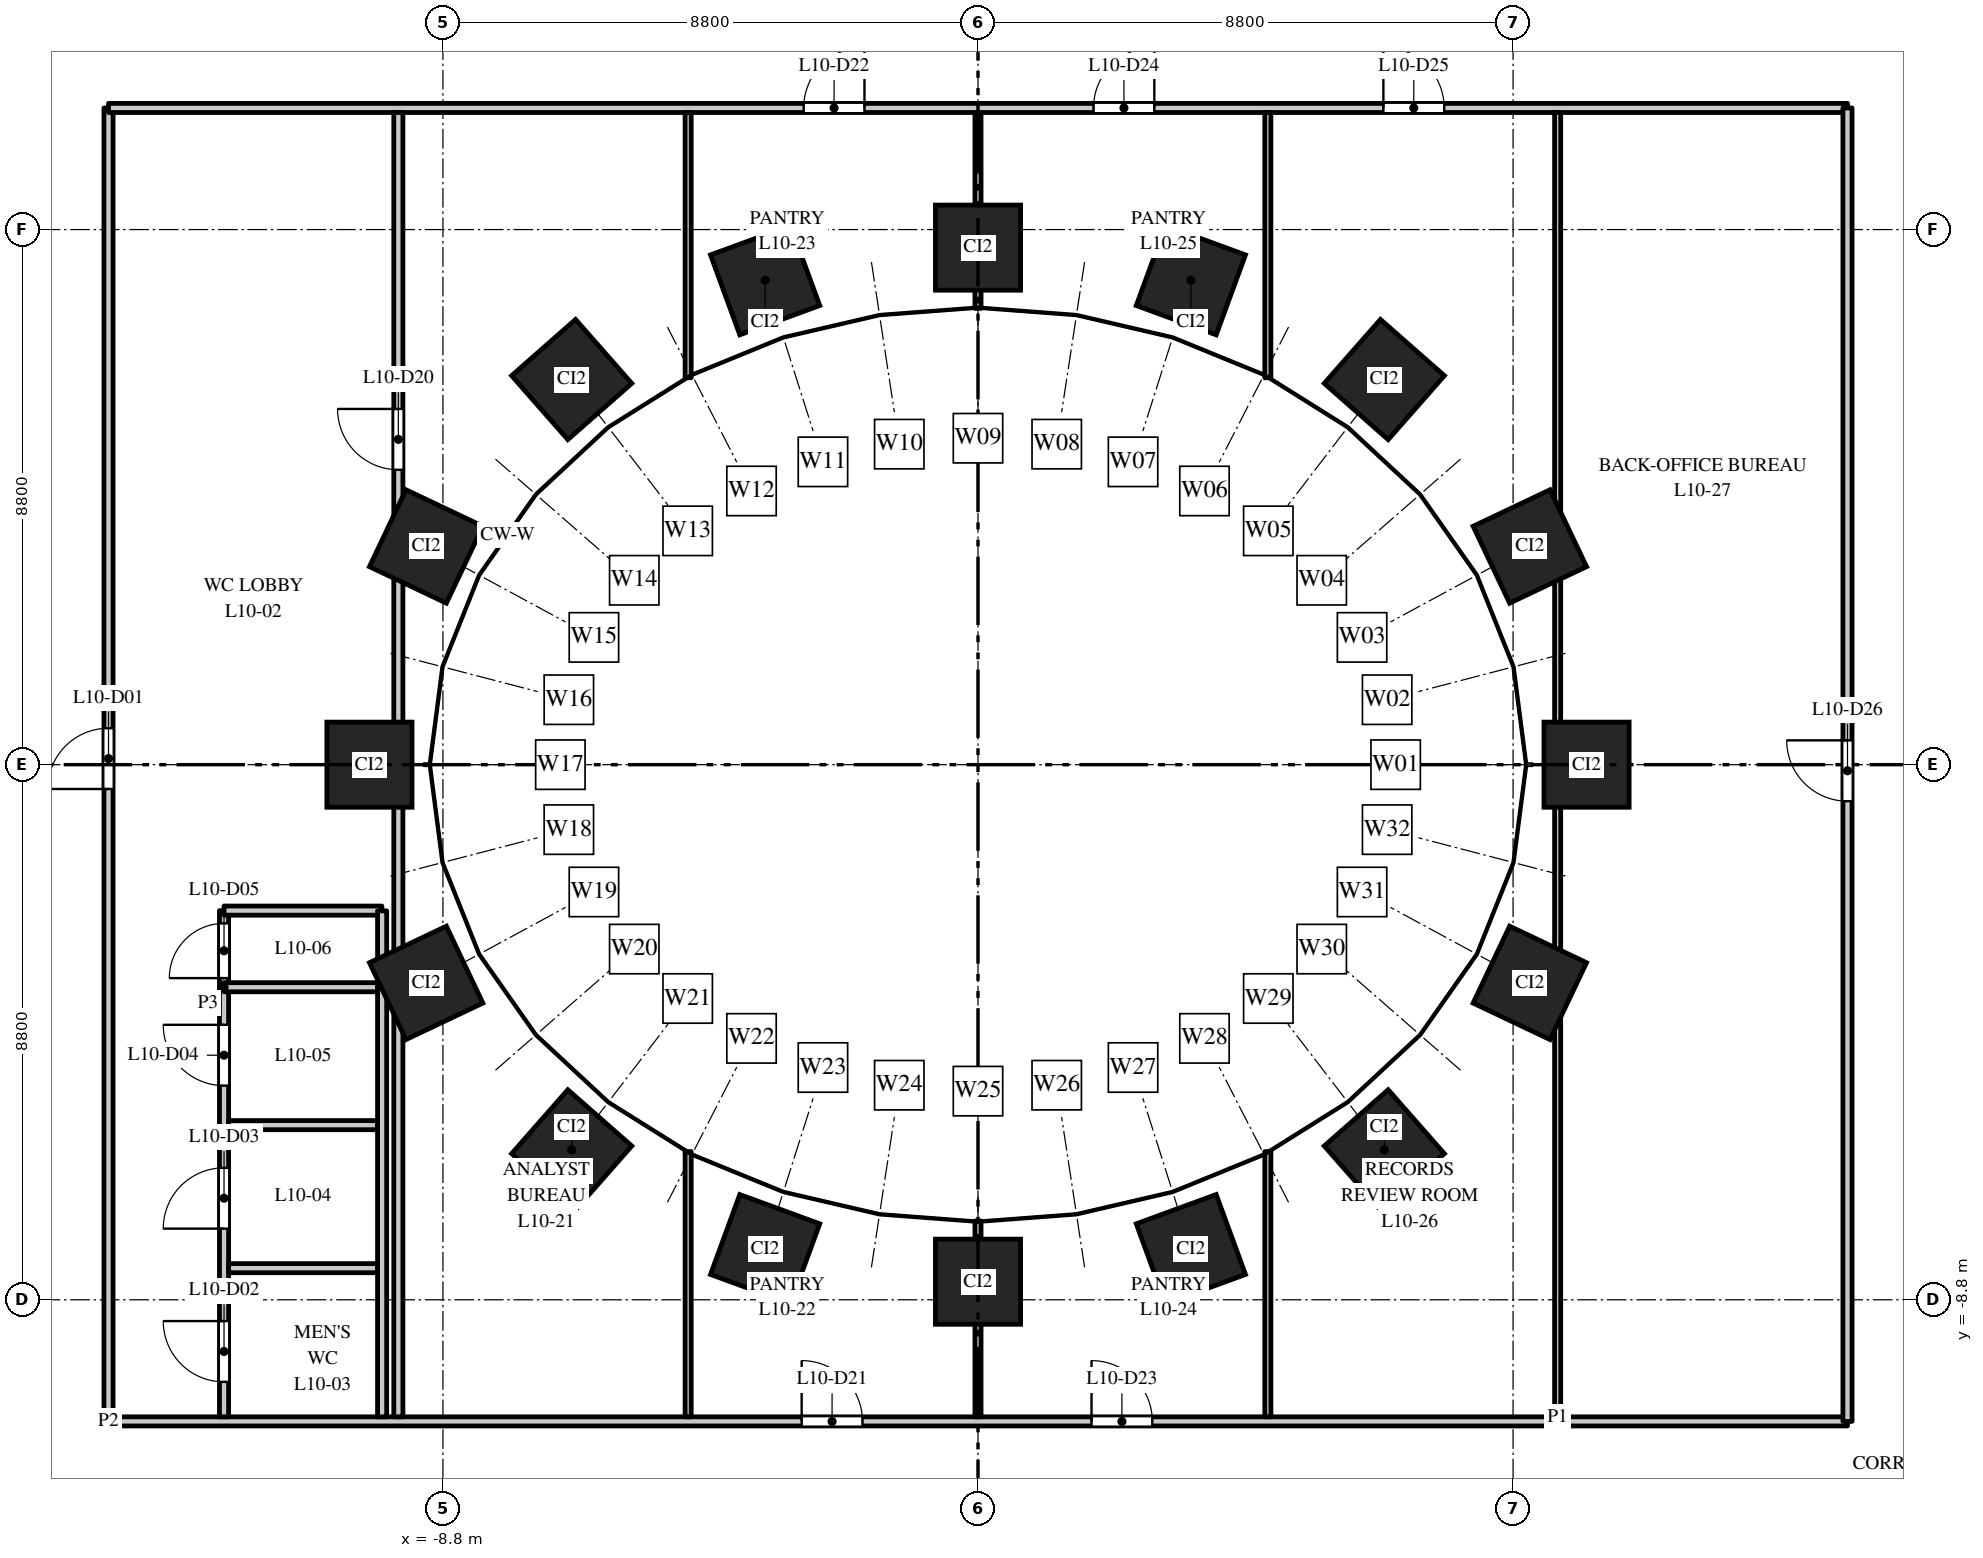
"""IFC4 building model, lengths in metres.
Left out: names, types, materials, properties, quantities, classifications, styles, units other than length and angle.
Written with IfcOpenShell. Run it as: python <this file> out.ifc"""

import sys

from ifc_helpers import new_model, si_unit, direction, frame, frame_2d, origin, origin_2d, place, context, subcontext, project, spatial, rectangle, extrude, element, fill, save


model = new_model("IFC4")
c1 = context("Model", 3, precision=1e-05, world=origin(), true_north=direction((0.0, 1.0)))
c2 = subcontext(c1, "Body", "Model", "MODEL_VIEW")
j1 = project(units=[si_unit("LENGTHUNIT", "METRE"), si_unit("PLANEANGLEUNIT", "RADIAN")], contexts=[c1])
p1 = place(None, origin())
s1 = spatial("IfcSite", under=j1, at=p1, CompositionType="ELEMENT")
p2 = place(p1, origin())
s2 = spatial("IfcBuilding", under=s1, at=p2, CompositionType="ELEMENT")
p3 = place(p2, frame((0.0, 0.0, 50.5)))
s3 = spatial("IfcBuildingStorey", under=s2, at=p3, CompositionType="ELEMENT", Elevation=50.5)
for number, where, z_axis, x_axis in (
    (1, (10.008, 0.0, 0.0), (0.0, 0.0, 1.0), (0.0, 1.0, 0.0)),
    (2, (9.076, 3.588, 0.0), (0.0, 0.0, 1.0), (-0.429, 0.903, 0.0)),
    (3, (6.682, 6.334, 0.0), (0.0, 0.0, 1.0), (-0.751, 0.66, 0.0)),
    (4, (3.501, 7.967, 0.0), (0.0, 0.0, 1.0), (-0.939, 0.344, 0.0)),
    (5, (0.0, 8.503, 0.0), (0.0, 0.0, 1.0), (-1.0, 0.0, 0.0)),
    (6, (-3.501, 7.967, 0.0), (0.0, 0.0, 1.0), (-0.939, -0.344, 0.0)),
    (7, (-6.682, 6.334, 0.0), (0.0, 0.0, 1.0), (-0.751, -0.66, 0.0)),
    (8, (-9.076, 3.588, 0.0), (0.0, 0.0, 1.0), (-0.429, -0.903, 0.0)),
    (9, (-10.008, 0.0, 0.0), (0.0, 0.0, 1.0), (0.0, -1.0, 0.0)),
    (10, (-9.076, -3.588, 0.0), (0.0, 0.0, 1.0), (0.429, -0.903, 0.0)),
    (11, (-6.682, -6.334, 0.0), (0.0, 0.0, 1.0), (0.751, -0.66, 0.0)),
    (12, (-3.501, -7.967, 0.0), (0.0, 0.0, 1.0), (0.939, -0.344, 0.0)),
    (13, (0.0, -8.503, 0.0), (0.0, 0.0, 1.0), (1.0, 0.0, 0.0)),
    (14, (3.501, -7.967, 0.0), (0.0, 0.0, 1.0), (0.939, 0.344, 0.0)),
    (15, (6.682, -6.334, 0.0), (0.0, 0.0, 1.0), (0.751, 0.66, 0.0)),
    (16, (9.076, -3.588, 0.0), (0.0, 0.0, 1.0), (0.429, 0.903, 0.0)),
):
    element("IfcColumn", number, at=place(p3, frame(where, z_axis=z_axis, x_axis=x_axis)), inside=s3, PredefinedType="COLUMN", context=c2, shape_type="SweptSolid", body=[
        extrude(rectangle(XDim=1.4, YDim=1.4, at=origin_2d()), origin(), (0.0, 0.0, 1.0), 4.0),
    ])
p4 = place(p3, frame((-14.3, -10.8, 0.0), z_axis=(0.0, 0.0, 1.0), x_axis=(0.0, 1.0, 0.0)))
e17 = element("IfcWall", 17, at=p4, inside=s3, PredefinedType="PARTITIONING", context=c2, shape_type="SweptSolid", body=[
    extrude(rectangle(XDim=21.6, YDim=0.15, at=frame_2d((10.8, 0.0))), origin(), (0.0, 0.0, 1.0), 2.75),
])
p5 = place(p4, frame((10.4, 0.0, 0.0)))
e18 = element("IfcOpeningElement", 18, at=p5, cuts=e17, PredefinedType="OPENING", context=c2, shape_type="SweptSolid", body=[
    extrude(rectangle(XDim=1.0, YDim=2.1, at=frame_2d((0.5, 1.05))), frame((0.0, 0.085, 0.0), z_axis=(0.0, -1.0, 0.0), x_axis=(1.0, 0.0, 0.0)), (0.0, 0.0, 1.0), 0.17),
])
p6 = place(p3, frame((-14.3, -10.8, 0.0), z_axis=(0.0, 0.0, 1.0), x_axis=(1.0, 0.0, 0.0)))
e19 = element("IfcWall", 19, at=p6, inside=s3, PredefinedType="PARTITIONING", context=c2, shape_type="SweptSolid", body=[
    extrude(rectangle(XDim=28.6, YDim=0.15, at=frame_2d((14.3, 0.0))), origin(), (0.0, 0.0, 1.0), 2.85),
])
p7 = place(p6, frame((11.4, 0.0, 0.0)))
e20 = element("IfcOpeningElement", 20, at=p7, cuts=e19, PredefinedType="OPENING", context=c2, shape_type="SweptSolid", body=[
    extrude(rectangle(XDim=1.0, YDim=2.1, at=frame_2d((0.5, 1.05))), frame((0.0, 0.085, 0.0), z_axis=(0.0, -1.0, 0.0), x_axis=(1.0, 0.0, 0.0)), (0.0, 0.0, 1.0), 0.17),
])
p8 = place(p6, frame((16.167, 0.0, 0.0)))
e21 = element("IfcOpeningElement", 21, at=p8, cuts=e19, PredefinedType="OPENING", context=c2, shape_type="SweptSolid", body=[
    extrude(rectangle(XDim=1.0, YDim=2.1, at=frame_2d((0.5, 1.05))), frame((0.0, 0.085, 0.0), z_axis=(0.0, -1.0, 0.0), x_axis=(1.0, 0.0, 0.0)), (0.0, 0.0, 1.0), 0.17),
])
p9 = place(p3, frame((-14.3, 10.8, 0.0), z_axis=(0.0, 0.0, 1.0), x_axis=(1.0, 0.0, 0.0)))
e22 = element("IfcWall", 22, at=p9, inside=s3, PredefinedType="PARTITIONING", context=c2, shape_type="SweptSolid", body=[
    extrude(rectangle(XDim=28.6, YDim=0.15, at=frame_2d((14.3, 0.0))), origin(), (0.0, 0.0, 1.0), 2.85),
])
p10 = place(p9, frame((11.433, 0.0, 0.0)))
e23 = element("IfcOpeningElement", 23, at=p10, cuts=e22, PredefinedType="OPENING", context=c2, shape_type="SweptSolid", body=[
    extrude(rectangle(XDim=1.0, YDim=2.1, at=frame_2d((0.5, 1.05))), frame((0.0, 0.085, 0.0), z_axis=(0.0, -1.0, 0.0), x_axis=(1.0, 0.0, 0.0)), (0.0, 0.0, 1.0), 0.17),
])
p11 = place(p9, frame((16.2, 0.0, 0.0)))
e24 = element("IfcOpeningElement", 24, at=p11, cuts=e22, PredefinedType="OPENING", context=c2, shape_type="SweptSolid", body=[
    extrude(rectangle(XDim=1.0, YDim=2.1, at=frame_2d((0.5, 1.05))), frame((0.0, 0.085, 0.0), z_axis=(0.0, -1.0, 0.0), x_axis=(1.0, 0.0, 0.0)), (0.0, 0.0, 1.0), 0.17),
])
p12 = place(p9, frame((20.967, 0.0, 0.0)))
e25 = element("IfcOpeningElement", 25, at=p12, cuts=e22, PredefinedType="OPENING", context=c2, shape_type="SweptSolid", body=[
    extrude(rectangle(XDim=1.0, YDim=2.1, at=frame_2d((0.5, 1.05))), frame((0.0, 0.085, 0.0), z_axis=(0.0, -1.0, 0.0), x_axis=(1.0, 0.0, 0.0)), (0.0, 0.0, 1.0), 0.17),
])
p13 = place(p3, frame((-12.4, -10.725, 0.0), z_axis=(0.0, 0.0, 1.0), x_axis=(0.0, 1.0, 0.0)))
e26 = element("IfcWall", 26, at=p13, inside=s3, PredefinedType="PARTITIONING", context=c2, shape_type="SweptSolid", body=[
    extrude(rectangle(XDim=7.065, YDim=0.15, at=frame_2d((3.533, 0.0))), origin(), (0.0, 0.0, 1.0), 2.75),
])
p14 = place(p13, frame((0.575, 0.0, 0.0)))
e27 = element("IfcOpeningElement", 27, at=p14, cuts=e26, PredefinedType="OPENING", context=c2, shape_type="SweptSolid", body=[
    extrude(rectangle(XDim=1.0, YDim=2.1, at=frame_2d((0.5, 1.05))), frame((0.0, 0.085, 0.0), z_axis=(0.0, -1.0, 0.0), x_axis=(1.0, 0.0, 0.0)), (0.0, 0.0, 1.0), 0.17),
])
p15 = place(p13, frame((3.095, 0.0, 0.0)))
e28 = element("IfcOpeningElement", 28, at=p15, cuts=e26, PredefinedType="OPENING", context=c2, shape_type="SweptSolid", body=[
    extrude(rectangle(XDim=1.0, YDim=2.1, at=frame_2d((0.5, 1.05))), frame((0.0, 0.085, 0.0), z_axis=(0.0, -1.0, 0.0), x_axis=(1.0, 0.0, 0.0)), (0.0, 0.0, 1.0), 0.17),
])
p16 = place(p13, frame((5.447, 0.0, 0.0)))
e29 = element("IfcOpeningElement", 29, at=p16, cuts=e26, PredefinedType="OPENING", context=c2, shape_type="SweptSolid", body=[
    extrude(rectangle(XDim=1.0, YDim=2.1, at=frame_2d((0.5, 1.05))), frame((0.0, 0.085, 0.0), z_axis=(0.0, -1.0, 0.0), x_axis=(1.0, 0.0, 0.0)), (0.0, 0.0, 1.0), 0.17),
])
p17 = place(p3, frame((-12.325, -8.28, 0.0), z_axis=(0.0, 0.0, 1.0), x_axis=(1.0, 0.0, 0.0)))
e30 = element("IfcWall", 30, at=p17, inside=s3, PredefinedType="PARTITIONING", context=c2, shape_type="SweptSolid", body=[
    extrude(rectangle(XDim=2.45, YDim=0.15, at=frame_2d((1.225, 0.0))), origin(), (0.0, 0.0, 1.0), 2.75),
])
p18 = place(p3, frame((-12.325, -5.928, 0.0), z_axis=(0.0, 0.0, 1.0), x_axis=(1.0, 0.0, 0.0)))
e31 = element("IfcWall", 31, at=p18, inside=s3, PredefinedType="PARTITIONING", context=c2, shape_type="SweptSolid", body=[
    extrude(rectangle(XDim=2.45, YDim=0.15, at=frame_2d((1.225, 0.0))), origin(), (0.0, 0.0, 1.0), 3.7),
])
p19 = place(p3, frame((-12.4, -3.66, 0.0), z_axis=(0.0, 0.0, 1.0), x_axis=(0.0, 1.0, 0.0)))
e32 = element("IfcWall", 32, at=p19, inside=s3, PredefinedType="PARTITIONING", context=c2, shape_type="SweptSolid", body=[
    extrude(rectangle(XDim=1.26, YDim=0.15, at=frame_2d((0.63, 0.0))), origin(), (0.0, 0.0, 1.0), 3.7),
])
p20 = place(p19, frame((0.15, 0.0, 0.0)))
e33 = element("IfcOpeningElement", 33, at=p20, cuts=e32, PredefinedType="OPENING", context=c2, shape_type="SweptSolid", body=[
    extrude(rectangle(XDim=0.9, YDim=2.1, at=frame_2d((0.45, 1.05))), frame((0.0, 0.085, 0.0), z_axis=(0.0, -1.0, 0.0), x_axis=(1.0, 0.0, 0.0)), (0.0, 0.0, 1.0), 0.17),
])
p21 = place(p3, frame((-12.4, -3.66, 0.0), z_axis=(0.0, 0.0, 1.0), x_axis=(1.0, 0.0, 0.0)))
e34 = element("IfcWall", 34, at=p21, inside=s3, PredefinedType="PARTITIONING", context=c2, shape_type="SweptSolid", body=[
    extrude(rectangle(XDim=2.6, YDim=0.15, at=frame_2d((1.3, 0.0))), origin(), (0.0, 0.0, 1.0), 3.7),
])
p22 = place(p3, frame((-12.4, -2.4, 0.0), z_axis=(0.0, 0.0, 1.0), x_axis=(1.0, 0.0, 0.0)))
e35 = element("IfcWall", 35, at=p22, inside=s3, PredefinedType="PARTITIONING", context=c2, shape_type="SweptSolid", body=[
    extrude(rectangle(XDim=2.596, YDim=0.15, at=frame_2d((1.298, 0.0))), origin(), (0.0, 0.0, 1.0), 3.7),
])
p23 = place(p3, frame((-9.8, -10.725, 0.0), z_axis=(0.0, 0.0, 1.0), x_axis=(0.0, 1.0, 0.0)))
e36 = element("IfcWall", 36, at=p23, inside=s3, PredefinedType="PARTITIONING", context=c2, shape_type="SweptSolid", body=[
    extrude(rectangle(XDim=7.065, YDim=0.15, at=frame_2d((3.533, 0.0))), origin(), (0.0, 0.0, 1.0), 2.75),
])
p24 = place(p3, frame((-9.8, -3.66, 0.0), z_axis=(0.0, 0.0, 1.0), x_axis=(0.0, 1.0, 0.0)))
e37 = element("IfcWall", 37, at=p24, inside=s3, PredefinedType="PARTITIONING", context=c2, shape_type="SweptSolid", body=[
    extrude(rectangle(XDim=1.256, YDim=0.15, at=frame_2d((0.628, 0.0))), origin(), (0.0, 0.0, 1.0), 3.7),
])
p25 = place(p3, frame((-9.533, -10.725, 0.0), z_axis=(0.0, 0.0, 1.0), x_axis=(0.0, 1.0, 0.0)))
e38 = element("IfcWall", 38, at=p25, inside=s3, PredefinedType="PARTITIONING", context=c2, shape_type="SweptSolid", body=[
    extrude(rectangle(XDim=21.45, YDim=0.15, at=frame_2d((10.725, 0.0))), origin(), (0.0, 0.0, 1.0), 2.75),
])
p26 = place(p25, frame((15.575, 0.0, 0.0)))
e39 = element("IfcOpeningElement", 39, at=p26, cuts=e38, PredefinedType="OPENING", context=c2, shape_type="SweptSolid", body=[
    extrude(rectangle(XDim=1.0, YDim=2.1, at=frame_2d((0.5, 1.05))), frame((0.0, 0.085, 0.0), z_axis=(0.0, -1.0, 0.0), x_axis=(1.0, 0.0, 0.0)), (0.0, 0.0, 1.0), 0.17),
])
for number, where, z_axis, x_axis in (
    (40, (-4.767, -10.725, 0.0), (0.0, 0.0, 1.0), (0.0, 1.0, 0.0)),
    (41, (-4.767, 6.363, 0.0), (0.0, 0.0, 1.0), (0.0, 1.0, 0.0)),
):
    element("IfcWall", number, at=place(p3, frame(where, z_axis=z_axis, x_axis=x_axis)), inside=s3, PredefinedType="PARTITIONING", context=c2, shape_type="SweptSolid", body=[
        extrude(rectangle(XDim=4.362, YDim=0.1, at=frame_2d((2.181, 0.0))), origin(), (0.0, 0.0, 1.0), 2.85),
    ])
for number, where, z_axis, x_axis in (
    (42, (0.0, -10.725, 0.0), (0.0, 0.0, 1.0), (0.0, 1.0, 0.0)),
    (43, (0.0, 7.504, 0.0), (0.0, 0.0, 1.0), (0.0, 1.0, 0.0)),
):
    element("IfcWall", number, at=place(p3, frame(where, z_axis=z_axis, x_axis=x_axis)), inside=s3, PredefinedType="PARTITIONING", context=c2, shape_type="SweptSolid", body=[
        extrude(rectangle(XDim=3.221, YDim=0.1, at=frame_2d((1.611, 0.0))), origin(), (0.0, 0.0, 1.0), 3.7),
    ])
for number, where, z_axis, x_axis in (
    (44, (4.767, -10.725, 0.0), (0.0, 0.0, 1.0), (0.0, 1.0, 0.0)),
    (45, (4.767, 6.363, 0.0), (0.0, 0.0, 1.0), (0.0, 1.0, 0.0)),
):
    element("IfcWall", number, at=place(p3, frame(where, z_axis=z_axis, x_axis=x_axis)), inside=s3, PredefinedType="PARTITIONING", context=c2, shape_type="SweptSolid", body=[
        extrude(rectangle(XDim=4.362, YDim=0.1, at=frame_2d((2.181, 0.0))), origin(), (0.0, 0.0, 1.0), 2.85),
    ])
p27 = place(p3, frame((9.533, -10.725, 0.0), z_axis=(0.0, 0.0, 1.0), x_axis=(0.0, 1.0, 0.0)))
e46 = element("IfcWall", 46, at=p27, inside=s3, PredefinedType="PARTITIONING", context=c2, shape_type="SweptSolid", body=[
    extrude(rectangle(XDim=21.45, YDim=0.1, at=frame_2d((10.725, 0.0))), origin(), (0.0, 0.0, 1.0), 2.75),
])
p28 = place(p3, frame((14.3, -10.8, 0.0), z_axis=(0.0, 0.0, 1.0), x_axis=(0.0, 1.0, 0.0)))
e47 = element("IfcWall", 47, at=p28, inside=s3, PredefinedType="PARTITIONING", context=c2, shape_type="SweptSolid", body=[
    extrude(rectangle(XDim=21.6, YDim=0.15, at=frame_2d((10.8, 0.0))), origin(), (0.0, 0.0, 1.0), 2.75),
])
p29 = place(p28, frame((10.2, 0.0, 0.0)))
e48 = element("IfcOpeningElement", 48, at=p29, cuts=e47, PredefinedType="OPENING", context=c2, shape_type="SweptSolid", body=[
    extrude(rectangle(XDim=1.0, YDim=2.1, at=frame_2d((0.5, 1.05))), frame((0.0, 0.085, 0.0), z_axis=(0.0, -1.0, 0.0), x_axis=(1.0, 0.0, 0.0)), (0.0, 0.0, 1.0), 0.17),
])
p30 = place(p5, origin())
e49 = element("IfcDoor", 49, at=p30, inside=s3, OperationType="SINGLE_SWING_LEFT", PredefinedType="DOOR", context=c2, shape_type="SweptSolid", body=[
    extrude(rectangle(XDim=1.0, YDim=2.1, at=frame_2d((0.5, 1.05))), frame((0.0, 0.025, 0.0), z_axis=(0.0, -1.0, 0.0), x_axis=(1.0, 0.0, 0.0)), (0.0, 0.0, 1.0), 0.05),
])
fill(e18, e49)
p31 = place(p14, origin())
e50 = element("IfcDoor", 50, at=p31, inside=s3, OperationType="SINGLE_SWING_RIGHT", PredefinedType="DOOR", context=c2, shape_type="SweptSolid", body=[
    extrude(rectangle(XDim=1.0, YDim=2.1, at=frame_2d((0.5, 1.05))), frame((0.0, 0.025, 0.0), z_axis=(0.0, -1.0, 0.0), x_axis=(1.0, 0.0, 0.0)), (0.0, 0.0, 1.0), 0.05),
])
fill(e27, e50)
p32 = place(p15, origin())
e51 = element("IfcDoor", 51, at=p32, inside=s3, OperationType="SINGLE_SWING_LEFT", PredefinedType="DOOR", context=c2, shape_type="SweptSolid", body=[
    extrude(rectangle(XDim=1.0, YDim=2.1, at=frame_2d((0.5, 1.05))), frame((0.0, 0.025, 0.0), z_axis=(0.0, -1.0, 0.0), x_axis=(1.0, 0.0, 0.0)), (0.0, 0.0, 1.0), 0.05),
])
fill(e28, e51)
p33 = place(p16, origin())
e52 = element("IfcDoor", 52, at=p33, inside=s3, OperationType="SINGLE_SWING_RIGHT", PredefinedType="DOOR", context=c2, shape_type="SweptSolid", body=[
    extrude(rectangle(XDim=1.0, YDim=2.1, at=frame_2d((0.5, 1.05))), frame((0.0, 0.025, 0.0), z_axis=(0.0, -1.0, 0.0), x_axis=(1.0, 0.0, 0.0)), (0.0, 0.0, 1.0), 0.05),
])
fill(e29, e52)
p34 = place(p20, origin())
e53 = element("IfcDoor", 53, at=p34, inside=s3, OperationType="SINGLE_SWING_LEFT", PredefinedType="DOOR", context=c2, shape_type="SweptSolid", body=[
    extrude(rectangle(XDim=0.9, YDim=2.1, at=frame_2d((0.45, 1.05))), frame((0.0, 0.025, 0.0), z_axis=(0.0, -1.0, 0.0), x_axis=(1.0, 0.0, 0.0)), (0.0, 0.0, 1.0), 0.05),
])
fill(e33, e53)
p35 = place(p26, origin())
e54 = element("IfcDoor", 54, at=p35, inside=s3, OperationType="SINGLE_SWING_RIGHT", PredefinedType="DOOR", context=c2, shape_type="SweptSolid", body=[
    extrude(rectangle(XDim=1.0, YDim=2.1, at=frame_2d((0.5, 1.05))), frame((0.0, 0.025, 0.0), z_axis=(0.0, -1.0, 0.0), x_axis=(1.0, 0.0, 0.0)), (0.0, 0.0, 1.0), 0.05),
])
fill(e39, e54)
p36 = place(p7, origin())
e55 = element("IfcDoor", 55, at=p36, inside=s3, OperationType="SINGLE_SWING_LEFT", PredefinedType="DOOR", context=c2, shape_type="SweptSolid", body=[
    extrude(rectangle(XDim=1.0, YDim=2.1, at=frame_2d((0.5, 1.05))), frame((0.0, 0.025, 0.0), z_axis=(0.0, -1.0, 0.0), x_axis=(1.0, 0.0, 0.0)), (0.0, 0.0, 1.0), 0.05),
])
fill(e20, e55)
p37 = place(p10, origin())
e56 = element("IfcDoor", 56, at=p37, inside=s3, OperationType="SINGLE_SWING_RIGHT", PredefinedType="DOOR", context=c2, shape_type="SweptSolid", body=[
    extrude(rectangle(XDim=1.0, YDim=2.1, at=frame_2d((0.5, 1.05))), frame((0.0, 0.025, 0.0), z_axis=(0.0, -1.0, 0.0), x_axis=(1.0, 0.0, 0.0)), (0.0, 0.0, 1.0), 0.05),
])
fill(e23, e56)
p38 = place(p8, origin())
e57 = element("IfcDoor", 57, at=p38, inside=s3, OperationType="SINGLE_SWING_LEFT", PredefinedType="DOOR", context=c2, shape_type="SweptSolid", body=[
    extrude(rectangle(XDim=1.0, YDim=2.1, at=frame_2d((0.5, 1.05))), frame((0.0, 0.025, 0.0), z_axis=(0.0, -1.0, 0.0), x_axis=(1.0, 0.0, 0.0)), (0.0, 0.0, 1.0), 0.05),
])
fill(e21, e57)
p39 = place(p11, origin())
e58 = element("IfcDoor", 58, at=p39, inside=s3, OperationType="SINGLE_SWING_RIGHT", PredefinedType="DOOR", context=c2, shape_type="SweptSolid", body=[
    extrude(rectangle(XDim=1.0, YDim=2.1, at=frame_2d((0.5, 1.05))), frame((0.0, 0.025, 0.0), z_axis=(0.0, -1.0, 0.0), x_axis=(1.0, 0.0, 0.0)), (0.0, 0.0, 1.0), 0.05),
])
fill(e24, e58)
p40 = place(p12, origin())
e59 = element("IfcDoor", 59, at=p40, inside=s3, OperationType="SINGLE_SWING_LEFT", PredefinedType="DOOR", context=c2, shape_type="SweptSolid", body=[
    extrude(rectangle(XDim=1.0, YDim=2.1, at=frame_2d((0.5, 1.05))), frame((0.0, 0.025, 0.0), z_axis=(0.0, -1.0, 0.0), x_axis=(1.0, 0.0, 0.0)), (0.0, 0.0, 1.0), 0.05),
])
fill(e25, e59)
p41 = place(p29, origin())
e60 = element("IfcDoor", 60, at=p41, inside=s3, OperationType="SINGLE_SWING_RIGHT", PredefinedType="DOOR", context=c2, shape_type="SweptSolid", body=[
    extrude(rectangle(XDim=1.0, YDim=2.1, at=frame_2d((0.5, 1.05))), frame((0.0, 0.025, 0.0), z_axis=(0.0, -1.0, 0.0), x_axis=(1.0, 0.0, 0.0)), (0.0, 0.0, 1.0), 0.05),
])
fill(e48, e60)
save(model, sys.argv[1])
